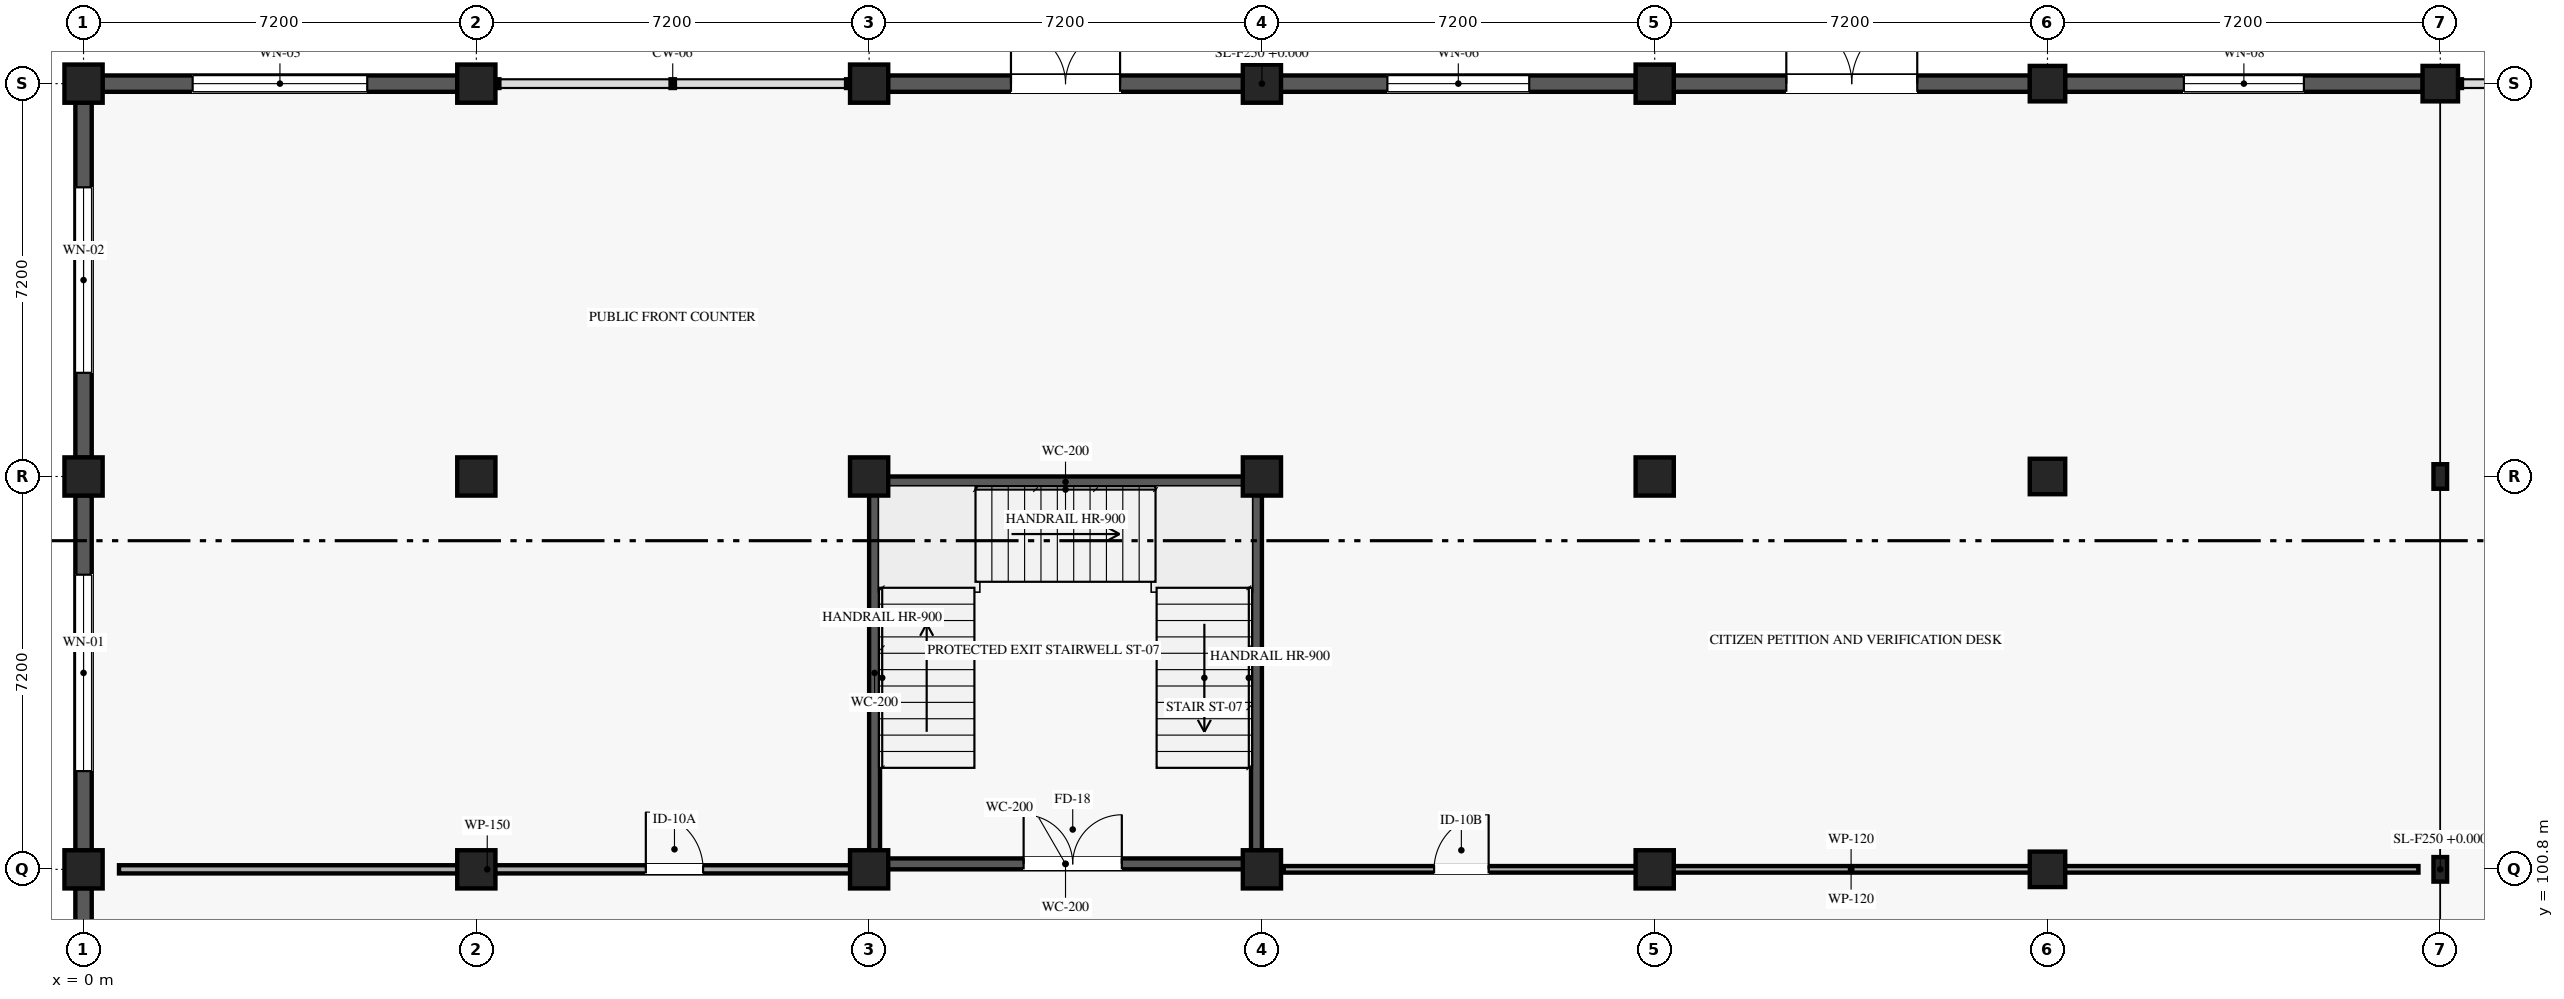
"""IFC4 building model, lengths in metres.
Left out: names, types, materials, properties, quantities, classifications, styles, units other than length and angle.
Written with IfcOpenShell. Run it as: python <this file> out.ifc"""

import sys

from ifc_helpers import new_model, si_unit, direction, frame, frame_2d, origin, origin_2d, place, context, subcontext, project, spatial, rectangle, i_section, extrude, element, fill, save


model = new_model("IFC4")
c1 = context("Model", 3, precision=1e-05, world=origin(), true_north=direction((0.0, 1.0)))
c2 = subcontext(c1, "Body", "Model", "MODEL_VIEW")
j1 = project(units=[si_unit("LENGTHUNIT", "METRE"), si_unit("PLANEANGLEUNIT", "RADIAN")], contexts=[c1])
p1 = place(None, origin())
s1 = spatial("IfcSite", under=j1, at=p1, CompositionType="ELEMENT")
p2 = place(p1, origin())
s2 = spatial("IfcBuilding", under=s1, at=p2, CompositionType="ELEMENT")
p3 = place(p2, origin())
s3 = spatial("IfcBuildingStorey", under=s2, at=p3, CompositionType="ELEMENT", Elevation=0.0)
for number, where, z_axis, x_axis in (
    (1, (0.0, 100.8, 0.0), (0.0, 0.0, 1.0), (1.0, 0.0, 0.0)),
    (2, (0.0, 108.0, 0.0), (0.0, 0.0, 1.0), (1.0, 0.0, 0.0)),
    (3, (0.0, 115.2, 0.0), (0.0, 0.0, 1.0), (1.0, 0.0, 0.0)),
    (4, (7.2, 100.8, 0.0), (0.0, 0.0, 1.0), (1.0, 0.0, 0.0)),
    (5, (7.2, 108.0, 0.0), (0.0, 0.0, 1.0), (1.0, 0.0, 0.0)),
    (6, (7.2, 115.2, 0.0), (0.0, 0.0, 1.0), (1.0, 0.0, 0.0)),
    (7, (14.4, 100.8, 0.0), (0.0, 0.0, 1.0), (1.0, 0.0, 0.0)),
    (8, (14.4, 108.0, 0.0), (0.0, 0.0, 1.0), (1.0, 0.0, 0.0)),
    (9, (14.4, 115.2, 0.0), (0.0, 0.0, 1.0), (1.0, 0.0, 0.0)),
    (10, (21.6, 100.8, 0.0), (0.0, 0.0, 1.0), (1.0, 0.0, 0.0)),
    (11, (21.6, 108.0, 0.0), (0.0, 0.0, 1.0), (1.0, 0.0, 0.0)),
    (12, (21.6, 115.2, 0.0), (0.0, 0.0, 1.0), (1.0, 0.0, 0.0)),
    (13, (28.8, 100.8, 0.0), (0.0, 0.0, 1.0), (1.0, 0.0, 0.0)),
    (14, (28.8, 108.0, 0.0), (0.0, 0.0, 1.0), (1.0, 0.0, 0.0)),
    (15, (28.8, 115.2, 0.0), (0.0, 0.0, 1.0), (1.0, 0.0, 0.0)),
):
    element("IfcColumn", number, at=place(p3, frame(where, z_axis=z_axis, x_axis=x_axis)), inside=s3, PredefinedType="COLUMN", context=c2, shape_type="SweptSolid", body=[
        extrude(rectangle(XDim=0.7, YDim=0.7, at=origin_2d()), origin(), (0.0, 0.0, 1.0), 5.4),
    ])
for number, where, z_axis, x_axis in (
    (16, (36.0, 100.8, 0.0), (0.0, 0.0, 1.0), (1.0, 0.0, 0.0)),
    (17, (36.0, 108.0, 0.0), (0.0, 0.0, 1.0), (1.0, 0.0, 0.0)),
    (18, (36.0, 115.2, 0.0), (0.0, 0.0, 1.0), (1.0, 0.0, 0.0)),
):
    element("IfcColumn", number, at=place(p3, frame(where, z_axis=z_axis, x_axis=x_axis)), inside=s3, PredefinedType="COLUMN", context=c2, shape_type="SweptSolid", body=[
        extrude(rectangle(XDim=0.65, YDim=0.65, at=origin_2d()), origin(), (0.0, 0.0, 1.0), 5.4),
    ])
for number, where, z_axis, x_axis in (
    (19, (43.2, 100.8, 0.0), (0.0, 0.0, 1.0), (1.0, 0.0, 0.0)),
    (20, (43.2, 108.0, 0.0), (0.0, 0.0, 1.0), (1.0, 0.0, 0.0)),
):
    element("IfcColumn", number, at=place(p3, frame(where, z_axis=z_axis, x_axis=x_axis)), inside=s3, PredefinedType="COLUMN", context=c2, shape_type="SweptSolid", body=[
        extrude(i_section(OverallWidth=0.25, OverallDepth=0.45, WebThickness=0.011, FlangeThickness=0.014, at=origin_2d()), origin(), (0.0, 0.0, 1.0), 5.4),
    ])
p4 = place(p3, frame((43.2, 115.2, 0.0), z_axis=(0.0, 0.0, 1.0), x_axis=(1.0, 0.0, 0.0)))
e21 = element("IfcColumn", 21, at=p4, inside=s3, PredefinedType="COLUMN", context=c2, shape_type="SweptSolid", body=[
    extrude(rectangle(XDim=0.65, YDim=0.65, at=origin_2d()), origin(), (0.0, 0.0, 1.0), 5.4),
])
p5 = place(p3, frame((0.345, 115.2, 0.0), z_axis=(0.0, 0.0, 1.0), x_axis=(1.0, 0.0, 0.0)))
e22 = element("IfcWall", 22, at=p5, inside=s3, PredefinedType="SOLIDWALL", context=c2, shape_type="SweptSolid", body=[
    extrude(rectangle(XDim=6.51, YDim=0.3, at=frame_2d((3.255, 0.0))), origin(), (0.0, 0.0, 1.0), 5.16),
])
p6 = place(p5, frame((1.655, 0.0, 0.85)))
e23 = element("IfcOpeningElement", 23, at=p6, cuts=e22, PredefinedType="OPENING", context=c2, shape_type="SweptSolid", body=[
    extrude(rectangle(XDim=3.2, YDim=1.95, at=frame_2d((1.6, 0.975))), frame((0.0, 0.16, 0.0), z_axis=(0.0, -1.0, 0.0), x_axis=(1.0, 0.0, 0.0)), (0.0, 0.0, 1.0), 0.32),
])
p7 = place(p3, frame((14.745, 115.2, 0.0), z_axis=(0.0, 0.0, 1.0), x_axis=(1.0, 0.0, 0.0)))
e24 = element("IfcWall", 24, at=p7, inside=s3, PredefinedType="SOLIDWALL", context=c2, shape_type="SweptSolid", body=[
    extrude(rectangle(XDim=6.51, YDim=0.3, at=frame_2d((3.255, 0.0))), origin(), (0.0, 0.0, 1.0), 5.16),
])
p8 = place(p7, frame((2.255, 0.0, 0.0)))
e25 = element("IfcOpeningElement", 25, at=p8, cuts=e24, PredefinedType="OPENING", context=c2, shape_type="SweptSolid", body=[
    extrude(rectangle(XDim=2.0, YDim=2.3, at=frame_2d((1.0, 1.15))), frame((0.0, 0.16, 0.0), z_axis=(0.0, -1.0, 0.0), x_axis=(1.0, 0.0, 0.0)), (0.0, 0.0, 1.0), 0.32),
])
p9 = place(p3, frame((21.945, 115.2, 0.0), z_axis=(0.0, 0.0, 1.0), x_axis=(1.0, 0.0, 0.0)))
e26 = element("IfcWall", 26, at=p9, inside=s3, PredefinedType="SOLIDWALL", context=c2, shape_type="SweptSolid", body=[
    extrude(rectangle(XDim=6.51, YDim=0.3, at=frame_2d((3.255, 0.0))), origin(), (0.0, 0.0, 1.0), 5.16),
])
p10 = place(p9, frame((1.955, 0.0, 0.85)))
e27 = element("IfcOpeningElement", 27, at=p10, cuts=e26, PredefinedType="OPENING", context=c2, shape_type="SweptSolid", body=[
    extrude(rectangle(XDim=2.6, YDim=1.8, at=frame_2d((1.3, 0.9))), frame((0.0, 0.16, 0.0), z_axis=(0.0, -1.0, 0.0), x_axis=(1.0, 0.0, 0.0)), (0.0, 0.0, 1.0), 0.32),
])
p11 = place(p3, frame((29.145, 115.2, 0.0), z_axis=(0.0, 0.0, 1.0), x_axis=(1.0, 0.0, 0.0)))
e28 = element("IfcWall", 28, at=p11, inside=s3, PredefinedType="SOLIDWALL", context=c2, shape_type="SweptSolid", body=[
    extrude(rectangle(XDim=6.535, YDim=0.3, at=frame_2d((3.268, 0.0))), origin(), (0.0, 0.0, 1.0), 5.16),
])
p12 = place(p11, frame((2.067, 0.0, 0.0)))
e29 = element("IfcOpeningElement", 29, at=p12, cuts=e28, PredefinedType="OPENING", context=c2, shape_type="SweptSolid", body=[
    extrude(rectangle(XDim=2.4, YDim=2.6, at=frame_2d((1.2, 1.3))), frame((0.0, 0.16, 0.0), z_axis=(0.0, -1.0, 0.0), x_axis=(1.0, 0.0, 0.0)), (0.0, 0.0, 1.0), 0.32),
])
p13 = place(p3, frame((36.32, 115.2, 0.0), z_axis=(0.0, 0.0, 1.0), x_axis=(1.0, 0.0, 0.0)))
e30 = element("IfcWall", 30, at=p13, inside=s3, PredefinedType="SOLIDWALL", context=c2, shape_type="SweptSolid", body=[
    extrude(rectangle(XDim=6.56, YDim=0.3, at=frame_2d((3.28, 0.0))), origin(), (0.0, 0.0, 1.0), 5.16),
])
p14 = place(p13, frame((2.18, 0.0, 0.85)))
e31 = element("IfcOpeningElement", 31, at=p14, cuts=e30, PredefinedType="OPENING", context=c2, shape_type="SweptSolid", body=[
    extrude(rectangle(XDim=2.2, YDim=1.7, at=frame_2d((1.1, 0.85))), frame((0.0, 0.16, 0.0), z_axis=(0.0, -1.0, 0.0), x_axis=(1.0, 0.0, 0.0)), (0.0, 0.0, 1.0), 0.32),
])
p15 = place(p3, frame((0.0, 93.895, 0.0), z_axis=(0.0, 0.0, 1.0), x_axis=(0.0, 1.0, 0.0)))
e32 = element("IfcWall", 32, at=p15, inside=s3, PredefinedType="SOLIDWALL", context=c2, shape_type="SweptSolid", body=[
    extrude(rectangle(XDim=6.56, YDim=0.3, at=frame_2d((3.28, 0.0))), origin(), (0.0, 0.0, 1.0), 5.16),
])
p16 = place(p15, frame((2.38, 0.0, 0.0)))
e33 = element("IfcOpeningElement", 33, at=p16, cuts=e32, PredefinedType="OPENING", context=c2, shape_type="SweptSolid", body=[
    extrude(rectangle(XDim=1.8, YDim=2.2, at=frame_2d((0.9, 1.1))), frame((0.0, 0.16, 0.0), z_axis=(0.0, -1.0, 0.0), x_axis=(1.0, 0.0, 0.0)), (0.0, 0.0, 1.0), 0.32),
])
p17 = place(p3, frame((0.0, 101.145, 0.0), z_axis=(0.0, 0.0, 1.0), x_axis=(0.0, 1.0, 0.0)))
e34 = element("IfcWall", 34, at=p17, inside=s3, PredefinedType="SOLIDWALL", context=c2, shape_type="SweptSolid", body=[
    extrude(rectangle(XDim=6.51, YDim=0.3, at=frame_2d((3.255, 0.0))), origin(), (0.0, 0.0, 1.0), 5.16),
])
p18 = place(p17, frame((1.455, 0.0, 0.85)))
e35 = element("IfcOpeningElement", 35, at=p18, cuts=e34, PredefinedType="OPENING", context=c2, shape_type="SweptSolid", body=[
    extrude(rectangle(XDim=3.6, YDim=2.05, at=frame_2d((1.8, 1.025))), frame((0.0, 0.16, 0.0), z_axis=(0.0, -1.0, 0.0), x_axis=(1.0, 0.0, 0.0)), (0.0, 0.0, 1.0), 0.32),
])
p19 = place(p3, frame((0.0, 108.345, 0.0), z_axis=(0.0, 0.0, 1.0), x_axis=(0.0, 1.0, 0.0)))
e36 = element("IfcWall", 36, at=p19, inside=s3, PredefinedType="SOLIDWALL", context=c2, shape_type="SweptSolid", body=[
    extrude(rectangle(XDim=6.51, YDim=0.3, at=frame_2d((3.255, 0.0))), origin(), (0.0, 0.0, 1.0), 5.16),
])
p20 = place(p19, frame((1.555, 0.0, 0.85)))
e37 = element("IfcOpeningElement", 37, at=p20, cuts=e36, PredefinedType="OPENING", context=c2, shape_type="SweptSolid", body=[
    extrude(rectangle(XDim=3.4, YDim=2.0, at=frame_2d((1.7, 1.0))), frame((0.0, 0.16, 0.0), z_axis=(0.0, -1.0, 0.0), x_axis=(1.0, 0.0, 0.0)), (0.0, 0.0, 1.0), 0.32),
])
p21 = place(p3, frame((14.6, 100.9, 0.0), z_axis=(0.0, 0.0, 1.0), x_axis=(1.0, 0.0, 0.0)))
e38 = element("IfcWall", 38, at=p21, inside=s3, PredefinedType="SHEAR", context=c2, shape_type="SweptSolid", body=[
    extrude(rectangle(XDim=6.8, YDim=0.2, at=frame_2d((3.4, 0.0))), origin(), (0.0, 0.0, 1.0), 5.16),
])
p22 = place(p21, frame((2.632, 0.0, 0.0)))
e39 = element("IfcOpeningElement", 39, at=p22, cuts=e38, PredefinedType="OPENING", context=c2, shape_type="SweptSolid", body=[
    extrude(rectangle(XDim=1.8, YDim=2.2, at=frame_2d((0.9, 1.1))), frame((0.0, 0.11, 0.0), z_axis=(0.0, -1.0, 0.0), x_axis=(1.0, 0.0, 0.0)), (0.0, 0.0, 1.0), 0.22),
])
p23 = place(p3, frame((14.6, 107.9, 0.0), z_axis=(0.0, 0.0, 1.0), x_axis=(1.0, 0.0, 0.0)))
e40 = element("IfcWall", 40, at=p23, inside=s3, PredefinedType="SHEAR", context=c2, shape_type="SweptSolid", body=[
    extrude(rectangle(XDim=6.8, YDim=0.2, at=frame_2d((3.4, 0.0))), origin(), (0.0, 0.0, 1.0), 5.16),
])
for number, where, z_axis, x_axis in (
    (41, (14.5, 101.0, 0.0), (0.0, 0.0, 1.0), (0.0, 1.0, 0.0)),
    (42, (21.5, 101.0, 0.0), (0.0, 0.0, 1.0), (0.0, 1.0, 0.0)),
):
    element("IfcWall", number, at=place(p3, frame(where, z_axis=z_axis, x_axis=x_axis)), inside=s3, PredefinedType="SHEAR", context=c2, shape_type="SweptSolid", body=[
        extrude(rectangle(XDim=6.8, YDim=0.2, at=frame_2d((3.4, 0.0))), origin(), (0.0, 0.0, 1.0), 5.16),
    ])
p24 = place(p3, frame((0.65, 100.8, 0.0), z_axis=(0.0, 0.0, 1.0), x_axis=(1.0, 0.0, 0.0)))
e43 = element("IfcWall", 43, at=p24, inside=s3, PredefinedType="PARTITIONING", context=c2, shape_type="SweptSolid", body=[
    extrude(rectangle(XDim=13.5, YDim=0.15, at=frame_2d((6.75, 0.0))), origin(), (0.0, 0.0, 1.0), 4.5),
])
p25 = place(p24, frame((9.657, 0.0, 0.0)))
e44 = element("IfcOpeningElement", 44, at=p25, cuts=e43, PredefinedType="OPENING", context=c2, shape_type="SweptSolid", body=[
    extrude(rectangle(XDim=1.05, YDim=2.15, at=frame_2d((0.525, 1.075))), frame((0.0, 0.085, 0.0), z_axis=(0.0, -1.0, 0.0), x_axis=(1.0, 0.0, 0.0)), (0.0, 0.0, 1.0), 0.17),
])
p26 = place(p3, frame((22.0, 100.8, 0.0), z_axis=(0.0, 0.0, 1.0), x_axis=(1.0, 0.0, 0.0)))
e45 = element("IfcWall", 45, at=p26, inside=s3, PredefinedType="PARTITIONING", context=c2, shape_type="SweptSolid", body=[
    extrude(rectangle(XDim=20.8, YDim=0.12, at=frame_2d((10.4, 0.0))), origin(), (0.0, 0.0, 1.0), 4.5),
])
p27 = place(p26, frame((2.756, 0.0, 0.0)))
e46 = element("IfcOpeningElement", 46, at=p27, cuts=e45, PredefinedType="OPENING", context=c2, shape_type="SweptSolid", body=[
    extrude(rectangle(XDim=1.0, YDim=2.1, at=frame_2d((0.5, 1.05))), frame((0.0, 0.07, 0.0), z_axis=(0.0, -1.0, 0.0), x_axis=(1.0, 0.0, 0.0)), (0.0, 0.0, 1.0), 0.14),
])
p28 = place(p6, origin())
e47 = element("IfcWindow", 47, at=p28, inside=s3, PartitioningType="SINGLE_PANEL", PredefinedType="WINDOW", context=c2, shape_type="SweptSolid", body=[
    extrude(rectangle(XDim=3.2, YDim=1.95, at=frame_2d((1.6, 0.975))), frame((0.0, 0.03, 0.0), z_axis=(0.0, -1.0, 0.0), x_axis=(1.0, 0.0, 0.0)), (0.0, 0.0, 1.0), 0.06),
])
fill(e23, e47)
p29 = place(p8, origin())
e48 = element("IfcDoor", 48, at=p29, inside=s3, OperationType="DOUBLE_DOOR_SINGLE_SWING", PredefinedType="DOOR", context=c2, shape_type="SweptSolid", body=[
    extrude(rectangle(XDim=2.0, YDim=2.3, at=frame_2d((1.0, 1.15))), frame((0.0, 0.025, 0.0), z_axis=(0.0, -1.0, 0.0), x_axis=(1.0, 0.0, 0.0)), (0.0, 0.0, 1.0), 0.05),
])
fill(e25, e48)
p30 = place(p10, origin())
e49 = element("IfcWindow", 49, at=p30, inside=s3, PartitioningType="SINGLE_PANEL", PredefinedType="WINDOW", context=c2, shape_type="SweptSolid", body=[
    extrude(rectangle(XDim=2.6, YDim=1.8, at=frame_2d((1.3, 0.9))), frame((0.0, 0.03, 0.0), z_axis=(0.0, -1.0, 0.0), x_axis=(1.0, 0.0, 0.0)), (0.0, 0.0, 1.0), 0.06),
])
fill(e27, e49)
p31 = place(p12, origin())
e50 = element("IfcDoor", 50, at=p31, inside=s3, OperationType="DOUBLE_DOOR_SINGLE_SWING", PredefinedType="DOOR", context=c2, shape_type="SweptSolid", body=[
    extrude(rectangle(XDim=2.4, YDim=2.6, at=frame_2d((1.2, 1.3))), frame((0.0, 0.025, 0.0), z_axis=(0.0, -1.0, 0.0), x_axis=(1.0, 0.0, 0.0)), (0.0, 0.0, 1.0), 0.05),
])
fill(e29, e50)
p32 = place(p14, origin())
e51 = element("IfcWindow", 51, at=p32, inside=s3, PartitioningType="SINGLE_PANEL", PredefinedType="WINDOW", context=c2, shape_type="SweptSolid", body=[
    extrude(rectangle(XDim=2.2, YDim=1.7, at=frame_2d((1.1, 0.85))), frame((0.0, 0.03, 0.0), z_axis=(0.0, -1.0, 0.0), x_axis=(1.0, 0.0, 0.0)), (0.0, 0.0, 1.0), 0.06),
])
fill(e31, e51)
p33 = place(p18, origin())
e52 = element("IfcWindow", 52, at=p33, inside=s3, PartitioningType="SINGLE_PANEL", PredefinedType="WINDOW", context=c2, shape_type="SweptSolid", body=[
    extrude(rectangle(XDim=3.6, YDim=2.05, at=frame_2d((1.8, 1.025))), frame((0.0, 0.03, 0.0), z_axis=(0.0, -1.0, 0.0), x_axis=(1.0, 0.0, 0.0)), (0.0, 0.0, 1.0), 0.06),
])
fill(e35, e52)
p34 = place(p20, origin())
e53 = element("IfcWindow", 53, at=p34, inside=s3, PartitioningType="SINGLE_PANEL", PredefinedType="WINDOW", context=c2, shape_type="SweptSolid", body=[
    extrude(rectangle(XDim=3.4, YDim=2.0, at=frame_2d((1.7, 1.0))), frame((0.0, 0.03, 0.0), z_axis=(0.0, -1.0, 0.0), x_axis=(1.0, 0.0, 0.0)), (0.0, 0.0, 1.0), 0.06),
])
fill(e37, e53)
p35 = place(p22, origin())
e54 = element("IfcDoor", 54, at=p35, inside=s3, OperationType="DOUBLE_DOOR_SINGLE_SWING", PredefinedType="DOOR", context=c2, shape_type="SweptSolid", body=[
    extrude(rectangle(XDim=1.8, YDim=2.2, at=frame_2d((0.9, 1.1))), frame((0.0, 0.025, 0.0), z_axis=(0.0, -1.0, 0.0), x_axis=(1.0, 0.0, 0.0)), (0.0, 0.0, 1.0), 0.05),
])
fill(e39, e54)
p36 = place(p25, origin())
e55 = element("IfcDoor", 55, at=p36, inside=s3, OperationType="SINGLE_SWING_LEFT", PredefinedType="DOOR", context=c2, shape_type="SweptSolid", body=[
    extrude(rectangle(XDim=1.05, YDim=2.15, at=frame_2d((0.525, 1.075))), frame((0.0, 0.025, 0.0), z_axis=(0.0, -1.0, 0.0), x_axis=(1.0, 0.0, 0.0)), (0.0, 0.0, 1.0), 0.05),
])
fill(e44, e55)
p37 = place(p27, origin())
e56 = element("IfcDoor", 56, at=p37, inside=s3, OperationType="SINGLE_SWING_RIGHT", PredefinedType="DOOR", context=c2, shape_type="SweptSolid", body=[
    extrude(rectangle(XDim=1.0, YDim=2.1, at=frame_2d((0.5, 1.05))), frame((0.0, 0.025, 0.0), z_axis=(0.0, -1.0, 0.0), x_axis=(1.0, 0.0, 0.0)), (0.0, 0.0, 1.0), 0.05),
])
fill(e46, e56)
save(model, sys.argv[1])
